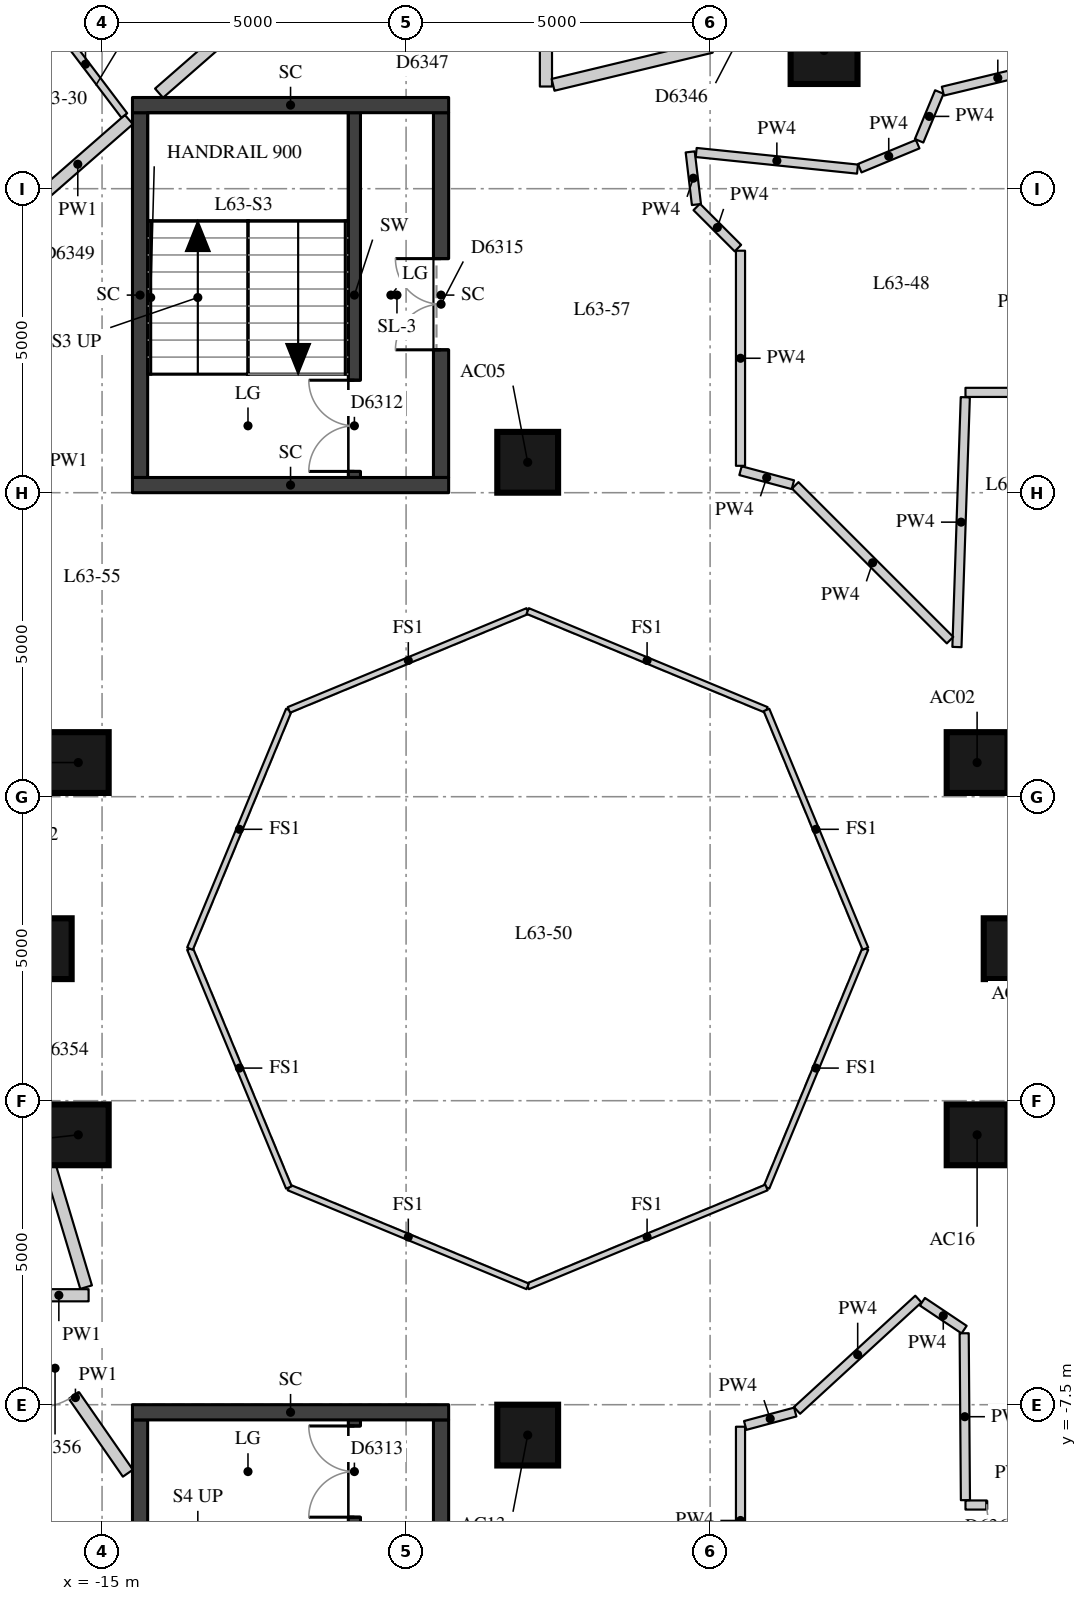
"""IFC4 building model, lengths in metres.
Left out: names, types, materials, properties, quantities, classifications, styles, units other than length and angle.
Written with IfcOpenShell. Run it as: python <this file> out.ifc"""

import sys

from ifc_helpers import new_model, si_unit, direction, frame, frame_2d, origin, origin_2d, place, context, subcontext, project, spatial, rectangle, extrude, element, fill, save


model = new_model("IFC4")
c1 = context("Model", 3, precision=1e-05, world=origin(), true_north=direction((0.0, 1.0)))
c2 = subcontext(c1, "Body", "Model", "MODEL_VIEW")
j1 = project(units=[si_unit("LENGTHUNIT", "METRE"), si_unit("PLANEANGLEUNIT", "RADIAN")], contexts=[c1])
p1 = place(None, origin())
s1 = spatial("IfcSite", under=j1, at=p1, CompositionType="ELEMENT")
p2 = place(p1, origin())
s2 = spatial("IfcBuilding", under=s1, at=p2, CompositionType="ELEMENT")
p3 = place(p2, frame((0.0, 0.0, 222.2)))
s3 = spatial("IfcBuildingStorey", under=s2, at=p3, CompositionType="ELEMENT", Elevation=222.2)
for number, where, z_axis, x_axis in (
    (1, (0.0, 0.0, 0.0), (0.0, 0.0, 1.0), (1.0, 0.0, 0.0)),
    (2, (-0.609, 3.062, 0.0), (0.0, 0.0, 1.0), (1.0, 0.0, 0.0)),
    (3, (-8.0, 8.0, 0.0), (0.0, 0.0, 1.0), (1.0, 0.0, 0.0)),
    (4, (-15.391, 3.062, 0.0), (0.0, 0.0, 1.0), (1.0, 0.0, 0.0)),
    (5, (-16.0, 0.0, 0.0), (0.0, 0.0, 1.0), (1.0, 0.0, 0.0)),
    (6, (-15.391, -3.062, 0.0), (0.0, 0.0, 1.0), (1.0, 0.0, 0.0)),
    (7, (-8.0, -8.0, 0.0), (0.0, 0.0, 1.0), (1.0, 0.0, 0.0)),
    (8, (-0.609, -3.062, 0.0), (0.0, 0.0, 1.0), (1.0, 0.0, 0.0)),
):
    element("IfcColumn", number, at=place(p3, frame(where, z_axis=z_axis, x_axis=x_axis)), inside=s3, PredefinedType="COLUMN", context=c2, shape_type="SweptSolid", body=[
        extrude(rectangle(XDim=1.0, YDim=1.0, at=origin_2d()), origin(), (0.0, 0.0, 1.0), 3.3),
    ])
p4 = place(p3, frame((-3.126, 14.772, 0.0), z_axis=(0.0, 0.0, 1.0), x_axis=(1.0, 0.0, 0.0)))
e9 = element("IfcColumn", 9, at=p4, inside=s3, PredefinedType="COLUMN", context=c2, shape_type="SweptSolid", body=[
    extrude(rectangle(XDim=1.1, YDim=1.1, at=origin_2d()), origin(), (0.0, 0.0, 1.0), 3.3),
])
p5 = place(p3, frame((-10.85, 7.75, 0.0), z_axis=(0.0, 0.0, 1.0), x_axis=(0.0, 1.0, 0.0)))
e10 = element("IfcWall", 10, at=p5, inside=s3, PredefinedType="SHEAR", context=c2, shape_type="SweptSolid", body=[
    extrude(rectangle(XDim=6.0, YDim=0.2, at=frame_2d((3.0, 0.0))), origin(), (0.0, 0.0, 1.0), 3.02),
])
p6 = place(p5, frame((0.1, 0.0, 0.0)))
e11 = element("IfcOpeningElement", 11, at=p6, cuts=e10, PredefinedType="OPENING", context=c2, shape_type="SweptSolid", body=[
    extrude(rectangle(XDim=1.5, YDim=2.1, at=frame_2d((0.75, 1.05))), frame((0.0, 0.11, 0.0), z_axis=(0.0, -1.0, 0.0), x_axis=(1.0, 0.0, 0.0)), (0.0, 0.0, 1.0), 0.22),
])
p7 = place(p3, frame((-10.85, -13.75, 0.0), z_axis=(0.0, 0.0, 1.0), x_axis=(0.0, 1.0, 0.0)))
e12 = element("IfcWall", 12, at=p7, inside=s3, PredefinedType="SHEAR", context=c2, shape_type="SweptSolid", body=[
    extrude(rectangle(XDim=6.0, YDim=0.2, at=frame_2d((3.0, 0.0))), origin(), (0.0, 0.0, 1.0), 3.02),
])
p8 = place(p7, frame((4.4, 0.0, 0.0)))
e13 = element("IfcOpeningElement", 13, at=p8, cuts=e12, PredefinedType="OPENING", context=c2, shape_type="SweptSolid", body=[
    extrude(rectangle(XDim=1.5, YDim=2.1, at=frame_2d((0.75, 1.05))), frame((0.0, 0.11, 0.0), z_axis=(0.0, -1.0, 0.0), x_axis=(1.0, 0.0, 0.0)), (0.0, 0.0, 1.0), 0.22),
])
p9 = place(p3, frame((-14.375, 7.75, -0.28), z_axis=(0.0, 0.0, 1.0), x_axis=(0.0, 1.0, 0.0)))
e14 = element("IfcWall", 14, at=p9, inside=s3, PredefinedType="SHEAR", context=c2, shape_type="SweptSolid", body=[
    extrude(rectangle(XDim=6.0, YDim=0.25, at=frame_2d((3.0, 0.0))), origin(), (0.0, 0.0, 1.0), 3.3),
])
p10 = place(p3, frame((-9.425, 7.75, -0.28), z_axis=(0.0, 0.0, 1.0), x_axis=(0.0, 1.0, 0.0)))
e15 = element("IfcWall", 15, at=p10, inside=s3, PredefinedType="SHEAR", context=c2, shape_type="SweptSolid", body=[
    extrude(rectangle(XDim=6.0, YDim=0.25, at=frame_2d((3.0, 0.0))), origin(), (0.0, 0.0, 1.0), 3.3),
])
p11 = place(p10, frame((2.1, 0.0, 0.28)))
e16 = element("IfcOpeningElement", 16, at=p11, cuts=e15, PredefinedType="OPENING", context=c2, shape_type="SweptSolid", body=[
    extrude(rectangle(XDim=1.5, YDim=2.1, at=frame_2d((0.75, 1.05))), frame((0.0, 0.135, 0.0), z_axis=(0.0, -1.0, 0.0), x_axis=(1.0, 0.0, 0.0)), (0.0, 0.0, 1.0), 0.27),
])
for number, where, z_axis, x_axis in (
    (17, (-14.5, 13.875, -0.28), (0.0, 0.0, 1.0), (1.0, 0.0, 0.0)),
    (18, (-14.5, 7.625, -0.28), (0.0, 0.0, 1.0), (1.0, 0.0, 0.0)),
):
    element("IfcWall", number, at=place(p3, frame(where, z_axis=z_axis, x_axis=x_axis)), inside=s3, PredefinedType="SHEAR", context=c2, shape_type="SweptSolid", body=[
        extrude(rectangle(XDim=5.2, YDim=0.25, at=frame_2d((2.6, 0.0))), origin(), (0.0, 0.0, 1.0), 3.3),
    ])
p12 = place(p3, frame((-14.375, -13.75, -0.28), z_axis=(0.0, 0.0, 1.0), x_axis=(0.0, 1.0, 0.0)))
e19 = element("IfcWall", 19, at=p12, inside=s3, PredefinedType="SHEAR", context=c2, shape_type="SweptSolid", body=[
    extrude(rectangle(XDim=6.0, YDim=0.25, at=frame_2d((3.0, 0.0))), origin(), (0.0, 0.0, 1.0), 3.3),
])
p13 = place(p3, frame((-9.425, -13.75, -0.28), z_axis=(0.0, 0.0, 1.0), x_axis=(0.0, 1.0, 0.0)))
e20 = element("IfcWall", 20, at=p13, inside=s3, PredefinedType="SHEAR", context=c2, shape_type="SweptSolid", body=[
    extrude(rectangle(XDim=6.0, YDim=0.25, at=frame_2d((3.0, 0.0))), origin(), (0.0, 0.0, 1.0), 3.3),
])
p14 = place(p13, frame((2.4, 0.0, 0.28)))
e21 = element("IfcOpeningElement", 21, at=p14, cuts=e20, PredefinedType="OPENING", context=c2, shape_type="SweptSolid", body=[
    extrude(rectangle(XDim=1.5, YDim=2.1, at=frame_2d((0.75, 1.05))), frame((0.0, 0.135, 0.0), z_axis=(0.0, -1.0, 0.0), x_axis=(1.0, 0.0, 0.0)), (0.0, 0.0, 1.0), 0.27),
])
p15 = place(p3, frame((-14.5, -7.625, -0.28), z_axis=(0.0, 0.0, 1.0), x_axis=(1.0, 0.0, 0.0)))
e22 = element("IfcWall", 22, at=p15, inside=s3, PredefinedType="SHEAR", context=c2, shape_type="SweptSolid", body=[
    extrude(rectangle(XDim=5.2, YDim=0.25, at=frame_2d((2.6, 0.0))), origin(), (0.0, 0.0, 1.0), 3.3),
])
p16 = place(p3, frame((-14.575, -8.627, 0.0), z_axis=(0.0, 0.0, 1.0), x_axis=(-0.569910381143, 0.821706856163, 0.0)))
e23 = element("IfcWall", 23, at=p16, inside=s3, PredefinedType="PARTITIONING", context=c2, shape_type="SweptSolid", body=[
    extrude(rectangle(XDim=3.026, YDim=0.2, at=frame_2d((1.513, 0.0))), origin(), (0.0, 0.0, 1.0), 3.02),
])
p17 = place(p16, frame((1.552, 0.0, 0.0)))
e24 = element("IfcOpeningElement", 24, at=p17, cuts=e23, PredefinedType="OPENING", context=c2, shape_type="SweptSolid", body=[
    extrude(rectangle(XDim=1.1, YDim=2.1, at=frame_2d((0.55, 1.05))), frame((0.0, 0.11, 0.0), z_axis=(0.0, -1.0, 0.0), x_axis=(1.0, 0.0, 0.0)), (0.0, 0.0, 1.0), 0.22),
])
p18 = place(p3, frame((-16.2, -5.7, 0.0), z_axis=(0.0, 0.0, 1.0), x_axis=(1.0, 0.0, 0.0)))
e25 = element("IfcWall", 25, at=p18, inside=s3, PredefinedType="PARTITIONING", context=c2, shape_type="SweptSolid", body=[
    extrude(rectangle(XDim=0.979, YDim=0.2, at=frame_2d((0.489, 0.0))), origin(), (0.0, 0.0, 1.0), 3.02),
])
p19 = place(p3, frame((-15.262, -5.567, 0.0), z_axis=(0.0, 0.0, 1.0), x_axis=(-0.28704593875, 0.957916817395, 0.0)))
e26 = element("IfcWall", 26, at=p19, inside=s3, PredefinedType="PARTITIONING", context=c2, shape_type="SweptSolid", body=[
    extrude(rectangle(XDim=6.751, YDim=0.2, at=frame_2d((3.375, 0.0))), origin(), (0.0, 0.0, 1.0), 3.02),
])
p20 = place(p19, frame((3.259, 0.0, 0.0)))
e27 = element("IfcOpeningElement", 27, at=p20, cuts=e26, PredefinedType="OPENING", context=c2, shape_type="SweptSolid", body=[
    extrude(rectangle(XDim=1.1, YDim=2.1, at=frame_2d((0.55, 1.05))), frame((0.0, 0.11, 0.0), z_axis=(0.0, -1.0, 0.0), x_axis=(1.0, 0.0, 0.0)), (0.0, 0.0, 1.0), 0.22),
])
p21 = place(p3, frame((-16.24, 12.168, 0.0), z_axis=(0.0, 0.0, 1.0), x_axis=(0.752820521129, 0.658225844956, 0.0)))
e28 = element("IfcWall", 28, at=p21, inside=s3, PredefinedType="PARTITIONING", context=c2, shape_type="SweptSolid", body=[
    extrude(rectangle(XDim=2.232, YDim=0.2, at=frame_2d((1.116, 0.0))), origin(), (0.0, 0.0, 1.0), 3.02),
])
p22 = place(p3, frame((-14.063, 14.071, 0.0), z_axis=(0.0, 0.0, 1.0), x_axis=(0.752870230185, 0.6581689878, 0.0)))
e29 = element("IfcWall", 29, at=p22, inside=s3, PredefinedType="PARTITIONING", context=c2, shape_type="SweptSolid", body=[
    extrude(rectangle(XDim=2.627, YDim=0.2, at=frame_2d((1.313, 0.0))), origin(), (0.0, 0.0, 1.0), 3.02),
])
p23 = place(p3, frame((-7.7, 15.639, 0.0), z_axis=(0.0, 0.0, 1.0), x_axis=(0.0, -1.0, 0.0)))
e30 = element("IfcWall", 30, at=p23, inside=s3, PredefinedType="PARTITIONING", context=c2, shape_type="SweptSolid", body=[
    extrude(rectangle(XDim=1.458, YDim=0.2, at=frame_2d((0.729, 0.0))), origin(), (0.0, 0.0, 1.0), 3.02),
])
p24 = place(p3, frame((-7.583, 14.208, 0.0), z_axis=(0.0, 0.0, 1.0), x_axis=(0.972284712223, 0.233799996531, 0.0)))
e31 = element("IfcWall", 31, at=p24, inside=s3, PredefinedType="PARTITIONING", context=c2, shape_type="SweptSolid", body=[
    extrude(rectangle(XDim=8.519, YDim=0.2, at=frame_2d((4.259, 0.0))), origin(), (0.0, 0.0, 1.0), 2.42),
])
p25 = place(p24, frame((5.667, 0.0, 0.0)))
e32 = element("IfcOpeningElement", 32, at=p25, cuts=e31, PredefinedType="OPENING", context=c2, shape_type="SweptSolid", body=[
    extrude(rectangle(XDim=0.9, YDim=2.1, at=frame_2d((0.45, 1.05))), frame((0.0, 0.11, 0.0), z_axis=(0.0, -1.0, 0.0), x_axis=(1.0, 0.0, 0.0)), (0.0, 0.0, 1.0), 0.22),
])
p26 = place(p24, frame((2.674, 0.0, 0.0)))
e33 = element("IfcOpeningElement", 33, at=p26, cuts=e31, PredefinedType="OPENING", context=c2, shape_type="SweptSolid", body=[
    extrude(rectangle(XDim=0.9, YDim=2.1, at=frame_2d((0.45, 1.05))), frame((0.0, 0.11, 0.0), z_axis=(0.0, -1.0, 0.0), x_axis=(1.0, 0.0, 0.0)), (0.0, 0.0, 1.0), 0.22),
])
p27 = place(p3, frame((0.72, 9.15, 0.0), z_axis=(0.0, 0.0, 1.0), x_axis=(-1.0, 0.0, 0.0)))
e34 = element("IfcWall", 34, at=p27, inside=s3, PredefinedType="PARTITIONING", context=c2, shape_type="SweptSolid", body=[
    extrude(rectangle(XDim=1.52, YDim=0.15, at=frame_2d((0.76, 0.0))), origin(), (0.0, 0.0, 1.0), 3.02),
])
p28 = place(p3, frame((-0.803, 9.07, 0.0), z_axis=(0.0, 0.0, 1.0), x_axis=(-0.033496761224, -0.999438826036, 0.0)))
e35 = element("IfcWall", 35, at=p28, inside=s3, PredefinedType="PARTITIONING", context=c2, shape_type="SweptSolid", body=[
    extrude(rectangle(XDim=4.111, YDim=0.15, at=frame_2d((2.055, 0.0))), origin(), (0.0, 0.0, 1.0), 3.02),
])
p29 = place(p3, frame((-1.054, 5.075, 0.0), z_axis=(0.0, 0.0, 1.0), x_axis=(-0.707106781187, 0.707106781187, 0.0)))
e36 = element("IfcWall", 36, at=p29, inside=s3, PredefinedType="PARTITIONING", context=c2, shape_type="SweptSolid", body=[
    extrude(rectangle(XDim=3.601, YDim=0.15, at=frame_2d((1.8, 0.0))), origin(), (0.0, 0.0, 1.0), 3.02),
])
p30 = place(p3, frame((-3.639, 7.631, 0.0), z_axis=(0.0, 0.0, 1.0), x_axis=(-0.965879594242, 0.258991523853, 0.0)))
e37 = element("IfcWall", 37, at=p30, inside=s3, PredefinedType="PARTITIONING", context=c2, shape_type="SweptSolid", body=[
    extrude(rectangle(XDim=0.892, YDim=0.15, at=frame_2d((0.446, 0.0))), origin(), (0.0, 0.0, 1.0), 3.02),
])
p31 = place(p3, frame((-4.5, 7.942, 0.0), z_axis=(0.0, 0.0, 1.0), x_axis=(0.0, 1.0, 0.0)))
e38 = element("IfcWall", 38, at=p31, inside=s3, PredefinedType="PARTITIONING", context=c2, shape_type="SweptSolid", body=[
    extrude(rectangle(XDim=3.538, YDim=0.15, at=frame_2d((1.769, 0.0))), origin(), (0.0, 0.0, 1.0), 3.02),
])
p32 = place(p3, frame((-4.542, 11.522, 0.0), z_axis=(0.0, 0.0, 1.0), x_axis=(-0.707106781187, 0.707106781187, 0.0)))
e39 = element("IfcWall", 39, at=p32, inside=s3, PredefinedType="PARTITIONING", context=c2, shape_type="SweptSolid", body=[
    extrude(rectangle(XDim=0.958, YDim=0.15, at=frame_2d((0.479, 0.0))), origin(), (0.0, 0.0, 1.0), 3.02),
])
p33 = place(p3, frame((-5.225, 12.24, 0.0), z_axis=(0.0, 0.0, 1.0), x_axis=(-0.117621146984, 0.993058540964, 0.0)))
e40 = element("IfcWall", 40, at=p33, inside=s3, PredefinedType="PARTITIONING", context=c2, shape_type="SweptSolid", body=[
    extrude(rectangle(XDim=0.872, YDim=0.15, at=frame_2d((0.436, 0.0))), origin(), (0.0, 0.0, 1.0), 3.02),
])
p34 = place(p3, frame((-5.229, 13.095, 0.0), z_axis=(0.0, 0.0, 1.0), x_axis=(0.994729851422, -0.102530593925, 0.0)))
e41 = element("IfcWall", 41, at=p34, inside=s3, PredefinedType="PARTITIONING", context=c2, shape_type="SweptSolid", body=[
    extrude(rectangle(XDim=2.667, YDim=0.15, at=frame_2d((1.333, 0.0))), origin(), (0.0, 0.0, 1.0), 3.02),
])
p35 = place(p3, frame((-2.539, 12.837, 0.0), z_axis=(0.0, 0.0, 1.0), x_axis=(0.923768662954, 0.382950985565, 0.0)))
e42 = element("IfcWall", 42, at=p35, inside=s3, PredefinedType="PARTITIONING", context=c2, shape_type="SweptSolid", body=[
    extrude(rectangle(XDim=1.031, YDim=0.15, at=frame_2d((0.516, 0.0))), origin(), (0.0, 0.0, 1.0), 3.02),
])
p36 = place(p3, frame((-1.563, 13.288, 0.0), z_axis=(0.0, 0.0, 1.0), x_axis=(0.383038417634, 0.923732412886, 0.0)))
e43 = element("IfcWall", 43, at=p36, inside=s3, PredefinedType="PARTITIONING", context=c2, shape_type="SweptSolid", body=[
    extrude(rectangle(XDim=0.869, YDim=0.15, at=frame_2d((0.434, 0.0))), origin(), (0.0, 0.0, 1.0), 3.02),
])
p37 = place(p3, frame((-1.172, 14.104, 0.0), z_axis=(0.0, 0.0, 1.0), x_axis=(0.972260724841, 0.233899728371, 0.0)))
e44 = element("IfcWall", 44, at=p37, inside=s3, PredefinedType="PARTITIONING", context=c2, shape_type="SweptSolid", body=[
    extrude(rectangle(XDim=1.858, YDim=0.15, at=frame_2d((0.929, 0.0))), origin(), (0.0, 0.0, 1.0), 2.42),
])
p38 = place(p3, frame((-0.8, -9.15, 0.0), z_axis=(0.0, 0.0, 1.0), x_axis=(1.0, 0.0, 0.0)))
e45 = element("IfcWall", 45, at=p38, inside=s3, PredefinedType="PARTITIONING", context=c2, shape_type="SweptSolid", body=[
    extrude(rectangle(XDim=1.6, YDim=0.15, at=frame_2d((0.8, 0.0))), origin(), (0.0, 0.0, 1.0), 3.02),
])
p39 = place(p38, frame((0.35, 0.0, 0.0)))
e46 = element("IfcOpeningElement", 46, at=p39, cuts=e45, PredefinedType="OPENING", context=c2, shape_type="SweptSolid", body=[
    extrude(rectangle(XDim=0.9, YDim=2.1, at=frame_2d((0.45, 1.05))), frame((0.0, 0.085, 0.0), z_axis=(0.0, -1.0, 0.0), x_axis=(1.0, 0.0, 0.0)), (0.0, 0.0, 1.0), 0.17),
])
p40 = place(p3, frame((-4.5, -10.947, 0.0), z_axis=(0.0, 0.0, 1.0), x_axis=(0.0, 1.0, 0.0)))
e47 = element("IfcWall", 47, at=p40, inside=s3, PredefinedType="PARTITIONING", context=c2, shape_type="SweptSolid", body=[
    extrude(rectangle(XDim=3.085, YDim=0.15, at=frame_2d((1.542, 0.0))), origin(), (0.0, 0.0, 1.0), 3.02),
])
p41 = place(p3, frame((-4.423, -7.842, 0.0), z_axis=(0.0, 0.0, 1.0), x_axis=(0.965853333569, 0.259089440221, 0.0)))
e48 = element("IfcWall", 48, at=p41, inside=s3, PredefinedType="PARTITIONING", context=c2, shape_type="SweptSolid", body=[
    extrude(rectangle(XDim=0.852, YDim=0.15, at=frame_2d((0.426, 0.0))), origin(), (0.0, 0.0, 1.0), 3.02),
])
p42 = place(p3, frame((-3.571, -7.594, 0.0), z_axis=(0.0, 0.0, 1.0), x_axis=(0.736783660812, 0.676128565555, 0.0)))
e49 = element("IfcWall", 49, at=p42, inside=s3, PredefinedType="PARTITIONING", context=c2, shape_type="SweptSolid", body=[
    extrude(rectangle(XDim=2.709, YDim=0.15, at=frame_2d((1.354, 0.0))), origin(), (0.0, 0.0, 1.0), 3.02),
])
p43 = place(p3, frame((-1.509, -5.806, 0.0), z_axis=(0.0, 0.0, 1.0), x_axis=(0.831367153095, -0.55572354346, 0.0)))
e50 = element("IfcWall", 50, at=p43, inside=s3, PredefinedType="PARTITIONING", context=c2, shape_type="SweptSolid", body=[
    extrude(rectangle(XDim=0.825, YDim=0.15, at=frame_2d((0.413, 0.0))), origin(), (0.0, 0.0, 1.0), 3.02),
])
p44 = place(p3, frame((-0.822, -6.325, 0.0), z_axis=(0.0, 0.0, 1.0), x_axis=(0.007471771501, -0.999972085926, 0.0)))
e51 = element("IfcWall", 51, at=p44, inside=s3, PredefinedType="PARTITIONING", context=c2, shape_type="SweptSolid", body=[
    extrude(rectangle(XDim=2.745, YDim=0.15, at=frame_2d((1.372, 0.0))), origin(), (0.0, 0.0, 1.0), 3.02),
])
p45 = place(p3, frame((-14.634, 13.704, 0.0), z_axis=(0.0, 0.0, 1.0), x_axis=(-0.603613230526, 0.797277284221, 0.0)))
e52 = element("IfcWall", 52, at=p45, inside=s3, PredefinedType="PARTITIONING", context=c2, shape_type="SweptSolid", body=[
    extrude(rectangle(XDim=2.115, YDim=0.12, at=frame_2d((1.058, 0.0))), origin(), (0.0, 0.0, 1.0), 3.02),
])
for number, where, z_axis, x_axis in (
    (53, (-2.446, 0.0, 0.0), (0.0, 0.0, 1.0), (-0.383, -0.924, 0.0)),
    (54, (-4.073, -3.927, 0.0), (0.0, 0.0, 1.0), (-0.924, -0.383, 0.0)),
    (55, (-8.0, -5.554, 0.0), (0.0, 0.0, 1.0), (-0.924, 0.383, 0.0)),
    (56, (-11.927, -3.927, 0.0), (0.0, 0.0, 1.0), (-0.383, 0.924, 0.0)),
    (57, (-13.554, 0.0, 0.0), (0.0, 0.0, 1.0), (0.383, 0.924, 0.0)),
    (58, (-11.927, 3.927, 0.0), (0.0, 0.0, 1.0), (0.924, 0.383, 0.0)),
    (59, (-8.0, 5.554, 0.0), (0.0, 0.0, 1.0), (0.924, -0.383, 0.0)),
    (60, (-4.073, 3.927, 0.0), (0.0, 0.0, 1.0), (0.383, -0.924, 0.0)),
):
    element("IfcWall", number, at=place(p3, frame(where, z_axis=z_axis, x_axis=x_axis)), inside=s3, PredefinedType="PARTITIONING", context=c2, shape_type="SweptSolid", body=[
        extrude(rectangle(XDim=4.251, YDim=0.1, at=frame_2d((2.125, 0.0))), origin(), (0.0, 0.0, 1.0), 3.02),
    ])
p46 = place(p6, origin())
e61 = element("IfcDoor", 61, at=p46, inside=s3, OperationType="DOUBLE_DOOR_SINGLE_SWING", PredefinedType="DOOR", context=c2, shape_type="SweptSolid", body=[
    extrude(rectangle(XDim=1.5, YDim=2.1, at=frame_2d((0.75, 1.05))), frame((0.0, 0.025, 0.0), z_axis=(0.0, -1.0, 0.0), x_axis=(1.0, 0.0, 0.0)), (0.0, 0.0, 1.0), 0.05),
])
fill(e11, e61)
p47 = place(p8, origin())
e62 = element("IfcDoor", 62, at=p47, inside=s3, OperationType="DOUBLE_DOOR_SINGLE_SWING", PredefinedType="DOOR", context=c2, shape_type="SweptSolid", body=[
    extrude(rectangle(XDim=1.5, YDim=2.1, at=frame_2d((0.75, 1.05))), frame((0.0, 0.025, 0.0), z_axis=(0.0, -1.0, 0.0), x_axis=(1.0, 0.0, 0.0)), (0.0, 0.0, 1.0), 0.05),
])
fill(e13, e62)
p48 = place(p11, origin())
e63 = element("IfcDoor", 63, at=p48, inside=s3, OperationType="DOUBLE_DOOR_SINGLE_SWING", PredefinedType="DOOR", context=c2, shape_type="SweptSolid", body=[
    extrude(rectangle(XDim=1.5, YDim=2.1, at=frame_2d((0.75, 1.05))), frame((0.0, 0.025, 0.0), z_axis=(0.0, -1.0, 0.0), x_axis=(1.0, 0.0, 0.0)), (0.0, 0.0, 1.0), 0.05),
])
fill(e16, e63)
p49 = place(p17, origin())
e64 = element("IfcDoor", 64, at=p49, inside=s3, OperationType="SINGLE_SWING_RIGHT", PredefinedType="DOOR", context=c2, shape_type="SweptSolid", body=[
    extrude(rectangle(XDim=1.1, YDim=2.1, at=frame_2d((0.55, 1.05))), frame((0.0, 0.025, 0.0), z_axis=(0.0, -1.0, 0.0), x_axis=(1.0, 0.0, 0.0)), (0.0, 0.0, 1.0), 0.05),
])
fill(e24, e64)
p50 = place(p39, origin())
e65 = element("IfcDoor", 65, at=p50, inside=s3, OperationType="SINGLE_SWING_LEFT", PredefinedType="DOOR", context=c2, shape_type="SweptSolid", body=[
    extrude(rectangle(XDim=0.9, YDim=2.1, at=frame_2d((0.45, 1.05))), frame((0.0, 0.025, 0.0), z_axis=(0.0, -1.0, 0.0), x_axis=(1.0, 0.0, 0.0)), (0.0, 0.0, 1.0), 0.05),
])
fill(e46, e65)
save(model, sys.argv[1])
